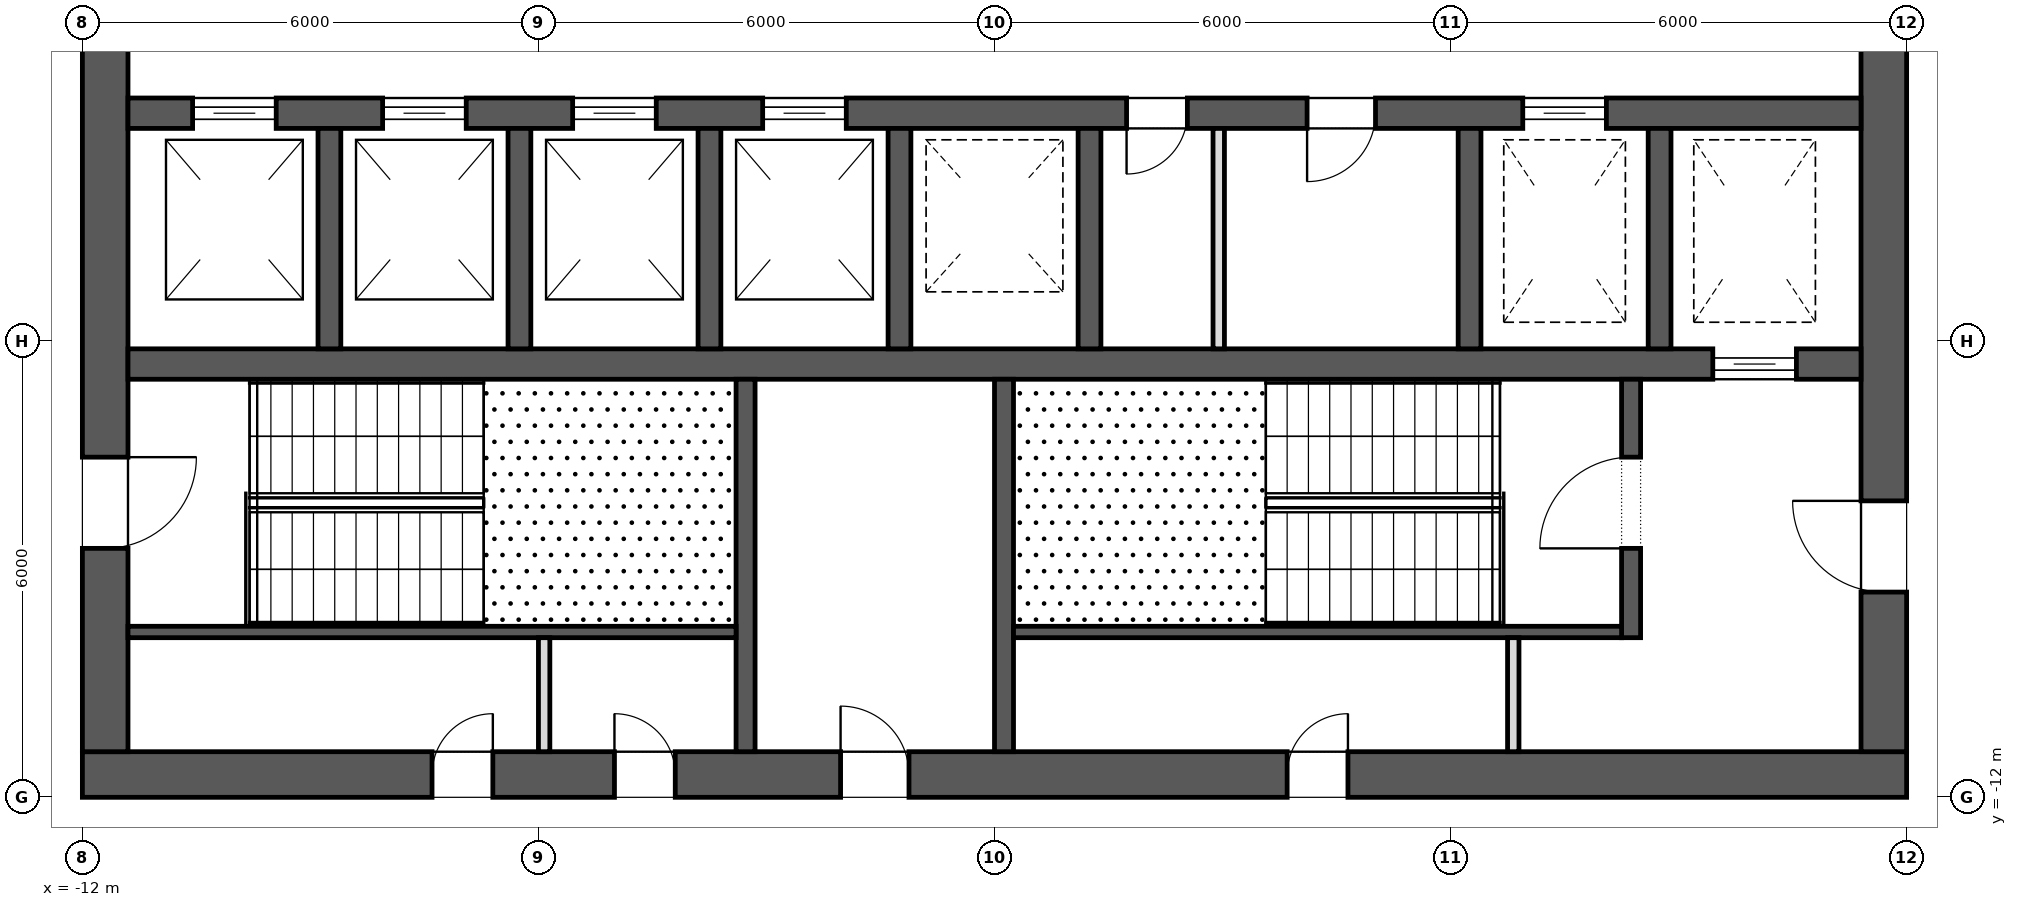
"""IFC4 building model, lengths in metres.
Left out: names, types, materials, properties, quantities, classifications, styles, units other than length and angle.
Written with IfcOpenShell. Run it as: python <this file> out.ifc"""

import sys

from ifc_helpers import new_model, si_unit, direction, frame, frame_2d, origin, place, context, subcontext, project, spatial, rectangle, extrude, element, fill, save


model = new_model("IFC4")
c1 = context("Model", 3, precision=1e-05, world=origin(), true_north=direction((0.0, 1.0)))
c2 = subcontext(c1, "Body", "Model", "MODEL_VIEW")
j1 = project(units=[si_unit("LENGTHUNIT", "METRE"), si_unit("PLANEANGLEUNIT", "RADIAN")], contexts=[c1])
p1 = place(None, origin())
s1 = spatial("IfcSite", under=j1, at=p1, CompositionType="ELEMENT")
p2 = place(p1, origin())
s2 = spatial("IfcBuilding", under=s1, at=p2, CompositionType="ELEMENT")
p3 = place(p2, frame((0.0, 0.0, 222.9)))
s3 = spatial("IfcBuildingStorey", under=s2, at=p3, CompositionType="ELEMENT", Elevation=222.9)
p4 = place(p3, frame((-12.0, -11.7, 0.0), z_axis=(0.0, 0.0, 1.0), x_axis=(1.0, 0.0, 0.0)))
e1 = element("IfcWall", 1, at=p4, inside=s3, PredefinedType="SHEAR", context=c2, shape_type="SweptSolid", body=[
    extrude(rectangle(XDim=24.0, YDim=0.6, at=frame_2d((12.0, 0.0))), origin(), (0.0, 0.0, 1.0), 4.0),
])
p5 = place(p4, frame((9.975, 0.0, 0.0)))
e2 = element("IfcOpeningElement", 2, at=p5, cuts=e1, PredefinedType="OPENING", context=c2, shape_type="SweptSolid", body=[
    extrude(rectangle(XDim=0.9, YDim=2.1, at=frame_2d((0.45, 1.05))), frame((0.0, 0.312, 0.0), z_axis=(0.0, -1.0, 0.0), x_axis=(1.0, 0.0, 0.0)), (0.0, 0.0, 1.0), 0.624),
])
p6 = place(p4, frame((4.6, 0.0, 0.0)))
e3 = element("IfcOpeningElement", 3, at=p6, cuts=e1, PredefinedType="OPENING", context=c2, shape_type="SweptSolid", body=[
    extrude(rectangle(XDim=0.8, YDim=2.1, at=frame_2d((0.4, 1.05))), frame((0.0, 0.312, 0.0), z_axis=(0.0, -1.0, 0.0), x_axis=(1.0, 0.0, 0.0)), (0.0, 0.0, 1.0), 0.624),
])
p7 = place(p4, frame((7.0, 0.0, 0.0)))
e4 = element("IfcOpeningElement", 4, at=p7, cuts=e1, PredefinedType="OPENING", context=c2, shape_type="SweptSolid", body=[
    extrude(rectangle(XDim=0.8, YDim=2.1, at=frame_2d((0.4, 1.05))), frame((0.0, 0.312, 0.0), z_axis=(0.0, -1.0, 0.0), x_axis=(1.0, 0.0, 0.0)), (0.0, 0.0, 1.0), 0.624),
])
p8 = place(p4, frame((15.85, 0.0, 0.0)))
e5 = element("IfcOpeningElement", 5, at=p8, cuts=e1, PredefinedType="OPENING", context=c2, shape_type="SweptSolid", body=[
    extrude(rectangle(XDim=0.8, YDim=2.1, at=frame_2d((0.4, 1.05))), frame((0.0, 0.312, 0.0), z_axis=(0.0, -1.0, 0.0), x_axis=(1.0, 0.0, 0.0)), (0.0, 0.0, 1.0), 0.624),
])
p9 = place(p3, frame((11.7, -11.4, 0.0), z_axis=(0.0, 0.0, 1.0), x_axis=(0.0, 1.0, 0.0)))
e6 = element("IfcWall", 6, at=p9, inside=s3, PredefinedType="SHEAR", context=c2, shape_type="SweptSolid", body=[
    extrude(rectangle(XDim=22.8, YDim=0.6, at=frame_2d((11.4, 0.0))), origin(), (0.0, 0.0, 1.0), 4.0),
])
p10 = place(p9, frame((10.2, 0.0, 0.0)))
e7 = element("IfcOpeningElement", 7, at=p10, cuts=e6, PredefinedType="OPENING", context=c2, shape_type="SweptSolid", body=[
    extrude(rectangle(XDim=2.4, YDim=2.1, at=frame_2d((1.2, 1.05))), frame((0.0, 0.312, 0.0), z_axis=(0.0, -1.0, 0.0), x_axis=(1.0, 0.0, 0.0)), (0.0, 0.0, 1.0), 0.624),
])
p11 = place(p9, frame((19.5, 0.0, 0.0)))
e8 = element("IfcOpeningElement", 8, at=p11, cuts=e6, PredefinedType="OPENING", context=c2, shape_type="SweptSolid", body=[
    extrude(rectangle(XDim=1.2, YDim=2.1, at=frame_2d((0.6, 1.05))), frame((0.0, 0.312, 0.0), z_axis=(0.0, -1.0, 0.0), x_axis=(1.0, 0.0, 0.0)), (0.0, 0.0, 1.0), 0.624),
])
p12 = place(p9, frame((2.1, 0.0, 0.0)))
e9 = element("IfcOpeningElement", 9, at=p12, cuts=e6, PredefinedType="OPENING", context=c2, shape_type="SweptSolid", body=[
    extrude(rectangle(XDim=1.2, YDim=2.1, at=frame_2d((0.6, 1.05))), frame((0.0, 0.312, 0.0), z_axis=(0.0, -1.0, 0.0), x_axis=(1.0, 0.0, 0.0)), (0.0, 0.0, 1.0), 0.624),
])
p13 = place(p3, frame((-11.7, -11.4, 0.0), z_axis=(0.0, 0.0, 1.0), x_axis=(0.0, 1.0, 0.0)))
e10 = element("IfcWall", 10, at=p13, inside=s3, PredefinedType="SHEAR", context=c2, shape_type="SweptSolid", body=[
    extrude(rectangle(XDim=22.8, YDim=0.6, at=frame_2d((11.4, 0.0))), origin(), (0.0, 0.0, 1.0), 4.0),
])
p14 = place(p13, frame((10.2, 0.0, 0.0)))
e11 = element("IfcOpeningElement", 11, at=p14, cuts=e10, PredefinedType="OPENING", context=c2, shape_type="SweptSolid", body=[
    extrude(rectangle(XDim=2.4, YDim=2.1, at=frame_2d((1.2, 1.05))), frame((0.0, 0.312, 0.0), z_axis=(0.0, -1.0, 0.0), x_axis=(1.0, 0.0, 0.0)), (0.0, 0.0, 1.0), 0.624),
])
p15 = place(p13, frame((18.925, 0.0, 0.0)))
e12 = element("IfcOpeningElement", 12, at=p15, cuts=e10, PredefinedType="OPENING", context=c2, shape_type="SweptSolid", body=[
    extrude(rectangle(XDim=1.2, YDim=2.1, at=frame_2d((0.6, 1.05))), frame((0.0, 0.312, 0.0), z_axis=(0.0, -1.0, 0.0), x_axis=(1.0, 0.0, 0.0)), (0.0, 0.0, 1.0), 0.624),
])
p16 = place(p13, frame((2.675, 0.0, 0.0)))
e13 = element("IfcOpeningElement", 13, at=p16, cuts=e10, PredefinedType="OPENING", context=c2, shape_type="SweptSolid", body=[
    extrude(rectangle(XDim=1.2, YDim=2.1, at=frame_2d((0.6, 1.05))), frame((0.0, 0.312, 0.0), z_axis=(0.0, -1.0, 0.0), x_axis=(1.0, 0.0, 0.0)), (0.0, 0.0, 1.0), 0.624),
])
p17 = place(p3, frame((-11.4, -3.0, 0.0), z_axis=(0.0, 0.0, 1.0), x_axis=(1.0, 0.0, 0.0)))
e14 = element("IfcWall", 14, at=p17, inside=s3, PredefinedType="SHEAR", context=c2, shape_type="SweptSolid", body=[
    extrude(rectangle(XDim=22.8, YDim=0.4, at=frame_2d((11.4, 0.0))), origin(), (0.0, 0.0, 1.0), 4.0),
])
p18 = place(p17, frame((0.85, 0.0, 0.0)))
e15 = element("IfcOpeningElement", 15, at=p18, cuts=e14, PredefinedType="OPENING", context=c2, shape_type="SweptSolid", body=[
    extrude(rectangle(XDim=1.1, YDim=2.1, at=frame_2d((0.55, 1.05))), frame((0.0, 0.212, 0.0), z_axis=(0.0, -1.0, 0.0), x_axis=(1.0, 0.0, 0.0)), (0.0, 0.0, 1.0), 0.424),
])
p19 = place(p17, frame((3.35, 0.0, 0.0)))
e16 = element("IfcOpeningElement", 16, at=p19, cuts=e14, PredefinedType="OPENING", context=c2, shape_type="SweptSolid", body=[
    extrude(rectangle(XDim=1.1, YDim=2.1, at=frame_2d((0.55, 1.05))), frame((0.0, 0.212, 0.0), z_axis=(0.0, -1.0, 0.0), x_axis=(1.0, 0.0, 0.0)), (0.0, 0.0, 1.0), 0.424),
])
p20 = place(p17, frame((5.85, 0.0, 0.0)))
e17 = element("IfcOpeningElement", 17, at=p20, cuts=e14, PredefinedType="OPENING", context=c2, shape_type="SweptSolid", body=[
    extrude(rectangle(XDim=1.1, YDim=2.1, at=frame_2d((0.55, 1.05))), frame((0.0, 0.212, 0.0), z_axis=(0.0, -1.0, 0.0), x_axis=(1.0, 0.0, 0.0)), (0.0, 0.0, 1.0), 0.424),
])
p21 = place(p17, frame((8.35, 0.0, 0.0)))
e18 = element("IfcOpeningElement", 18, at=p21, cuts=e14, PredefinedType="OPENING", context=c2, shape_type="SweptSolid", body=[
    extrude(rectangle(XDim=1.1, YDim=2.1, at=frame_2d((0.55, 1.05))), frame((0.0, 0.212, 0.0), z_axis=(0.0, -1.0, 0.0), x_axis=(1.0, 0.0, 0.0)), (0.0, 0.0, 1.0), 0.424),
])
p22 = place(p17, frame((18.35, 0.0, 0.0)))
e19 = element("IfcOpeningElement", 19, at=p22, cuts=e14, PredefinedType="OPENING", context=c2, shape_type="SweptSolid", body=[
    extrude(rectangle(XDim=1.1, YDim=2.1, at=frame_2d((0.55, 1.05))), frame((0.0, 0.212, 0.0), z_axis=(0.0, -1.0, 0.0), x_axis=(1.0, 0.0, 0.0)), (0.0, 0.0, 1.0), 0.424),
])
p23 = place(p17, frame((13.137, 0.0, 0.0)))
e20 = element("IfcOpeningElement", 20, at=p23, cuts=e14, PredefinedType="OPENING", context=c2, shape_type="SweptSolid", body=[
    extrude(rectangle(XDim=0.8, YDim=2.1, at=frame_2d((0.4, 1.05))), frame((0.0, 0.212, 0.0), z_axis=(0.0, -1.0, 0.0), x_axis=(1.0, 0.0, 0.0)), (0.0, 0.0, 1.0), 0.424),
])
p24 = place(p17, frame((15.512, 0.0, 0.0)))
e21 = element("IfcOpeningElement", 21, at=p24, cuts=e14, PredefinedType="OPENING", context=c2, shape_type="SweptSolid", body=[
    extrude(rectangle(XDim=0.9, YDim=2.1, at=frame_2d((0.45, 1.05))), frame((0.0, 0.212, 0.0), z_axis=(0.0, -1.0, 0.0), x_axis=(1.0, 0.0, 0.0)), (0.0, 0.0, 1.0), 0.424),
])
p25 = place(p3, frame((-11.4, -6.3, 0.0), z_axis=(0.0, 0.0, 1.0), x_axis=(1.0, 0.0, 0.0)))
e22 = element("IfcWall", 22, at=p25, inside=s3, PredefinedType="SHEAR", context=c2, shape_type="SweptSolid", body=[
    extrude(rectangle(XDim=22.8, YDim=0.4, at=frame_2d((11.4, 0.0))), origin(), (0.0, 0.0, 1.0), 4.0),
])
p26 = place(p25, frame((20.85, 0.0, 0.0)))
e23 = element("IfcOpeningElement", 23, at=p26, cuts=e22, PredefinedType="OPENING", context=c2, shape_type="SweptSolid", body=[
    extrude(rectangle(XDim=1.1, YDim=2.1, at=frame_2d((0.55, 1.05))), frame((0.0, 0.212, 0.0), z_axis=(0.0, -1.0, 0.0), x_axis=(1.0, 0.0, 0.0)), (0.0, 0.0, 1.0), 0.424),
])
for number, where, z_axis, x_axis in (
    (24, (-8.75, -6.1, 0.0), (0.0, 0.0, 1.0), (0.0, 1.0, 0.0)),
    (25, (-6.25, -6.1, 0.0), (0.0, 0.0, 1.0), (0.0, 1.0, 0.0)),
    (26, (-3.75, -6.1, 0.0), (0.0, 0.0, 1.0), (0.0, 1.0, 0.0)),
    (27, (-1.25, -6.1, 0.0), (0.0, 0.0, 1.0), (0.0, 1.0, 0.0)),
    (28, (1.25, -6.1, 0.0), (0.0, 0.0, 1.0), (0.0, 1.0, 0.0)),
    (29, (6.25, -6.1, 0.0), (0.0, 0.0, 1.0), (0.0, 1.0, 0.0)),
    (30, (8.75, -6.1, 0.0), (0.0, 0.0, 1.0), (0.0, 1.0, 0.0)),
):
    element("IfcWall", number, at=place(p3, frame(where, z_axis=z_axis, x_axis=x_axis)), inside=s3, PredefinedType="SHEAR", context=c2, shape_type="SweptSolid", body=[
        extrude(rectangle(XDim=2.9, YDim=0.3, at=frame_2d((1.45, 0.0))), origin(), (0.0, 0.0, 1.0), 4.0),
    ])
for number, where, z_axis, x_axis in (
    (31, (-3.275, -11.4, 0.0), (0.0, 0.0, 1.0), (0.0, 1.0, 0.0)),
    (32, (0.125, -11.4, 0.0), (0.0, 0.0, 1.0), (0.0, 1.0, 0.0)),
):
    element("IfcWall", number, at=place(p3, frame(where, z_axis=z_axis, x_axis=x_axis)), inside=s3, PredefinedType="SHEAR", context=c2, shape_type="SweptSolid", body=[
        extrude(rectangle(XDim=4.9, YDim=0.25, at=frame_2d((2.45, 0.0))), origin(), (0.0, 0.0, 1.0), 3.7),
    ])
p27 = place(p3, frame((8.375, -9.9, 0.0), z_axis=(0.0, 0.0, 1.0), x_axis=(0.0, 1.0, 0.0)))
e33 = element("IfcWall", 33, at=p27, inside=s3, PredefinedType="SHEAR", context=c2, shape_type="SweptSolid", body=[
    extrude(rectangle(XDim=3.4, YDim=0.25, at=frame_2d((1.7, 0.0))), origin(), (0.0, 0.0, 1.0), 3.7),
])
p28 = place(p27, frame((1.175, 0.0, 0.0)))
e34 = element("IfcOpeningElement", 34, at=p28, cuts=e33, PredefinedType="OPENING", context=c2, shape_type="SweptSolid", body=[
    extrude(rectangle(XDim=1.2, YDim=2.1, at=frame_2d((0.6, 1.05))), frame((0.0, 0.137, 0.0), z_axis=(0.0, -1.0, 0.0), x_axis=(1.0, 0.0, 0.0)), (0.0, 0.0, 1.0), 0.274),
])
for number, where, z_axis, x_axis in (
    (35, (-11.4, -9.825, 0.0), (0.0, 0.0, 1.0), (1.0, 0.0, 0.0)),
    (36, (0.25, -9.825, 0.0), (0.0, 0.0, 1.0), (1.0, 0.0, 0.0)),
):
    element("IfcWall", number, at=place(p3, frame(where, z_axis=z_axis, x_axis=x_axis)), inside=s3, PredefinedType="SHEAR", context=c2, shape_type="SweptSolid", body=[
        extrude(rectangle(XDim=8.0, YDim=0.15, at=frame_2d((4.0, 0.0))), origin(), (0.0, 0.0, 1.0), 3.7),
    ])
for number, where, z_axis, x_axis in (
    (37, (-5.925, -11.4, 0.0), (0.0, 0.0, 1.0), (0.0, 1.0, 0.0)),
    (38, (6.825, -11.4, 0.0), (0.0, 0.0, 1.0), (0.0, 1.0, 0.0)),
):
    element("IfcWall", number, at=place(p3, frame(where, z_axis=z_axis, x_axis=x_axis)), inside=s3, PredefinedType="PARTITIONING", context=c2, shape_type="SweptSolid", body=[
        extrude(rectangle(XDim=1.5, YDim=0.15, at=frame_2d((0.75, 0.0))), origin(), (0.0, 0.0, 1.0), 3.7),
    ])
p29 = place(p3, frame((2.95, -6.1, 0.0), z_axis=(0.0, 0.0, 1.0), x_axis=(0.0, 1.0, 0.0)))
e39 = element("IfcWall", 39, at=p29, inside=s3, PredefinedType="PARTITIONING", context=c2, shape_type="SweptSolid", body=[
    extrude(rectangle(XDim=2.9, YDim=0.15, at=frame_2d((1.45, 0.0))), origin(), (0.0, 0.0, 1.0), 3.7),
])
p30 = place(p26, origin())
e40 = element("IfcDoor", 40, at=p30, inside=s3, OperationType="SLIDING_TO_LEFT", PredefinedType="DOOR", context=c2, shape_type="SweptSolid", body=[
    extrude(rectangle(XDim=1.1, YDim=2.1, at=frame_2d((0.55, 1.05))), frame((0.0, 0.025, 0.0), z_axis=(0.0, -1.0, 0.0), x_axis=(1.0, 0.0, 0.0)), (0.0, 0.0, 1.0), 0.05),
])
fill(e23, e40)
p31 = place(p18, origin())
e41 = element("IfcDoor", 41, at=p31, inside=s3, OperationType="SLIDING_TO_LEFT", PredefinedType="DOOR", context=c2, shape_type="SweptSolid", body=[
    extrude(rectangle(XDim=1.1, YDim=2.1, at=frame_2d((0.55, 1.05))), frame((0.0, 0.025, 0.0), z_axis=(0.0, -1.0, 0.0), x_axis=(1.0, 0.0, 0.0)), (0.0, 0.0, 1.0), 0.05),
])
fill(e15, e41)
p32 = place(p19, origin())
e42 = element("IfcDoor", 42, at=p32, inside=s3, OperationType="SLIDING_TO_LEFT", PredefinedType="DOOR", context=c2, shape_type="SweptSolid", body=[
    extrude(rectangle(XDim=1.1, YDim=2.1, at=frame_2d((0.55, 1.05))), frame((0.0, 0.025, 0.0), z_axis=(0.0, -1.0, 0.0), x_axis=(1.0, 0.0, 0.0)), (0.0, 0.0, 1.0), 0.05),
])
fill(e16, e42)
p33 = place(p20, origin())
e43 = element("IfcDoor", 43, at=p33, inside=s3, OperationType="SLIDING_TO_LEFT", PredefinedType="DOOR", context=c2, shape_type="SweptSolid", body=[
    extrude(rectangle(XDim=1.1, YDim=2.1, at=frame_2d((0.55, 1.05))), frame((0.0, 0.025, 0.0), z_axis=(0.0, -1.0, 0.0), x_axis=(1.0, 0.0, 0.0)), (0.0, 0.0, 1.0), 0.05),
])
fill(e17, e43)
p34 = place(p21, origin())
e44 = element("IfcDoor", 44, at=p34, inside=s3, OperationType="SLIDING_TO_LEFT", PredefinedType="DOOR", context=c2, shape_type="SweptSolid", body=[
    extrude(rectangle(XDim=1.1, YDim=2.1, at=frame_2d((0.55, 1.05))), frame((0.0, 0.025, 0.0), z_axis=(0.0, -1.0, 0.0), x_axis=(1.0, 0.0, 0.0)), (0.0, 0.0, 1.0), 0.05),
])
fill(e18, e44)
p35 = place(p22, origin())
e45 = element("IfcDoor", 45, at=p35, inside=s3, OperationType="SLIDING_TO_LEFT", PredefinedType="DOOR", context=c2, shape_type="SweptSolid", body=[
    extrude(rectangle(XDim=1.1, YDim=2.1, at=frame_2d((0.55, 1.05))), frame((0.0, 0.025, 0.0), z_axis=(0.0, -1.0, 0.0), x_axis=(1.0, 0.0, 0.0)), (0.0, 0.0, 1.0), 0.05),
])
fill(e19, e45)
p36 = place(p16, frame((1.2, 0.0, 0.0), z_axis=(0.0, 0.0, 1.0), x_axis=(-1.0, 0.0, 0.0)))
e46 = element("IfcDoor", 46, at=p36, inside=s3, OperationType="SINGLE_SWING_RIGHT", PredefinedType="DOOR", context=c2, shape_type="SweptSolid", body=[
    extrude(rectangle(XDim=1.2, YDim=2.1, at=frame_2d((0.6, 1.05))), frame((0.0, 0.025, 0.0), z_axis=(0.0, -1.0, 0.0), x_axis=(1.0, 0.0, 0.0)), (0.0, 0.0, 1.0), 0.05),
])
fill(e13, e46)
p37 = place(p28, origin())
e47 = element("IfcDoor", 47, at=p37, inside=s3, OperationType="SINGLE_SWING_RIGHT", PredefinedType="DOOR", context=c2, shape_type="SweptSolid", body=[
    extrude(rectangle(XDim=1.2, YDim=2.1, at=frame_2d((0.6, 1.05))), frame((0.0, 0.025, 0.0), z_axis=(0.0, -1.0, 0.0), x_axis=(1.0, 0.0, 0.0)), (0.0, 0.0, 1.0), 0.05),
])
fill(e34, e47)
p38 = place(p12, origin())
e48 = element("IfcDoor", 48, at=p38, inside=s3, OperationType="SINGLE_SWING_LEFT", PredefinedType="DOOR", context=c2, shape_type="SweptSolid", body=[
    extrude(rectangle(XDim=1.2, YDim=2.1, at=frame_2d((0.6, 1.05))), frame((0.0, 0.025, 0.0), z_axis=(0.0, -1.0, 0.0), x_axis=(1.0, 0.0, 0.0)), (0.0, 0.0, 1.0), 0.05),
])
fill(e9, e48)
p39 = place(p5, origin())
e49 = element("IfcDoor", 49, at=p39, inside=s3, OperationType="SINGLE_SWING_RIGHT", PredefinedType="DOOR", context=c2, shape_type="SweptSolid", body=[
    extrude(rectangle(XDim=0.9, YDim=2.1, at=frame_2d((0.45, 1.05))), frame((0.0, 0.025, 0.0), z_axis=(0.0, -1.0, 0.0), x_axis=(1.0, 0.0, 0.0)), (0.0, 0.0, 1.0), 0.05),
])
fill(e2, e49)
p40 = place(p6, origin())
e50 = element("IfcDoor", 50, at=p40, inside=s3, OperationType="SINGLE_SWING_LEFT", PredefinedType="DOOR", context=c2, shape_type="SweptSolid", body=[
    extrude(rectangle(XDim=0.8, YDim=2.1, at=frame_2d((0.4, 1.05))), frame((0.0, 0.025, 0.0), z_axis=(0.0, -1.0, 0.0), x_axis=(1.0, 0.0, 0.0)), (0.0, 0.0, 1.0), 0.05),
])
fill(e3, e50)
p41 = place(p7, origin())
e51 = element("IfcDoor", 51, at=p41, inside=s3, OperationType="SINGLE_SWING_RIGHT", PredefinedType="DOOR", context=c2, shape_type="SweptSolid", body=[
    extrude(rectangle(XDim=0.8, YDim=2.1, at=frame_2d((0.4, 1.05))), frame((0.0, 0.025, 0.0), z_axis=(0.0, -1.0, 0.0), x_axis=(1.0, 0.0, 0.0)), (0.0, 0.0, 1.0), 0.05),
])
fill(e4, e51)
p42 = place(p8, origin())
e52 = element("IfcDoor", 52, at=p42, inside=s3, OperationType="SINGLE_SWING_LEFT", PredefinedType="DOOR", context=c2, shape_type="SweptSolid", body=[
    extrude(rectangle(XDim=0.8, YDim=2.1, at=frame_2d((0.4, 1.05))), frame((0.0, 0.025, 0.0), z_axis=(0.0, -1.0, 0.0), x_axis=(1.0, 0.0, 0.0)), (0.0, 0.0, 1.0), 0.05),
])
fill(e5, e52)
p43 = place(p23, frame((0.8, 0.0, 0.0), z_axis=(0.0, 0.0, 1.0), x_axis=(-1.0, 0.0, 0.0)))
e53 = element("IfcDoor", 53, at=p43, inside=s3, OperationType="SINGLE_SWING_LEFT", PredefinedType="DOOR", context=c2, shape_type="SweptSolid", body=[
    extrude(rectangle(XDim=0.8, YDim=2.1, at=frame_2d((0.4, 1.05))), frame((0.0, 0.025, 0.0), z_axis=(0.0, -1.0, 0.0), x_axis=(1.0, 0.0, 0.0)), (0.0, 0.0, 1.0), 0.05),
])
fill(e20, e53)
p44 = place(p24, frame((0.9, 0.0, 0.0), z_axis=(0.0, 0.0, 1.0), x_axis=(-1.0, 0.0, 0.0)))
e54 = element("IfcDoor", 54, at=p44, inside=s3, OperationType="SINGLE_SWING_LEFT", PredefinedType="DOOR", context=c2, shape_type="SweptSolid", body=[
    extrude(rectangle(XDim=0.9, YDim=2.1, at=frame_2d((0.45, 1.05))), frame((0.0, 0.025, 0.0), z_axis=(0.0, -1.0, 0.0), x_axis=(1.0, 0.0, 0.0)), (0.0, 0.0, 1.0), 0.05),
])
fill(e21, e54)
save(model, sys.argv[1])
